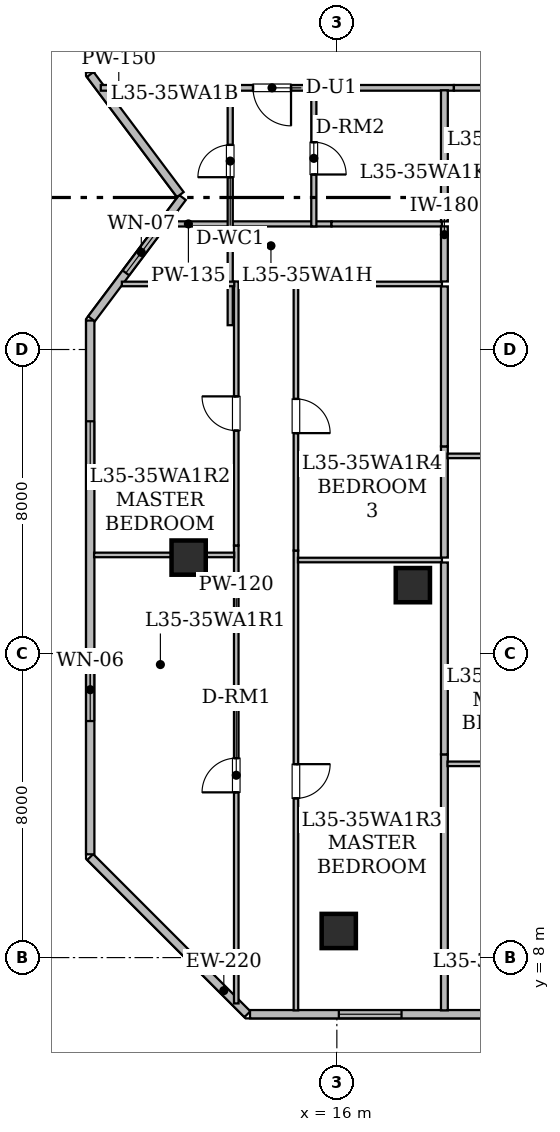
"""IFC4 building model, lengths in metres.
Left out: names, types, materials, properties, quantities, classifications, styles, units other than length and angle.
Written with IfcOpenShell. Run it as: python <this file> out.ifc"""

import sys

from ifc_helpers import new_model, si_unit, direction, frame, frame_2d, origin, origin_2d, place, context, subcontext, project, spatial, rectangle, hollow_rectangle, extrude, element, fill, save


model = new_model("IFC4")
c1 = context("Model", 3, precision=1e-05, world=origin(), true_north=direction((0.0, 1.0)))
c2 = subcontext(c1, "Body", "Model", "MODEL_VIEW")
j1 = project(units=[si_unit("LENGTHUNIT", "METRE"), si_unit("PLANEANGLEUNIT", "RADIAN")], contexts=[c1])
p1 = place(None, origin())
s1 = spatial("IfcSite", under=j1, at=p1, CompositionType="ELEMENT")
p2 = place(p1, origin())
s2 = spatial("IfcBuilding", under=s1, at=p2, CompositionType="ELEMENT")
p3 = place(p2, frame((0.0, 0.0, 138.4)))
s3 = spatial("IfcBuildingStorey", under=s2, at=p3, CompositionType="ELEMENT", Elevation=138.4)
for number, where, z_axis, x_axis in (
    (1, (16.05, 8.7, 0.0), (0.0, 0.0, 1.0), (1.0, 0.0, 0.0)),
    (2, (12.1, 18.525, 0.0), (0.0, 0.0, 1.0), (1.0, 0.0, 0.0)),
    (3, (18.0, 17.8, 0.0), (0.0, 0.0, 1.0), (1.0, 0.0, 0.0)),
):
    element("IfcColumn", number, at=place(p3, frame(where, z_axis=z_axis, x_axis=x_axis)), inside=s3, PredefinedType="COLUMN", context=c2, shape_type="SweptSolid", body=[
        extrude(hollow_rectangle(XDim=0.9, YDim=0.9, WallThickness=0.045, at=origin_2d()), origin(), (0.0, 0.0, 1.0), 3.65),
    ])
p4 = place(p3, frame((13.646, 6.51, 0.0), z_axis=(0.0, 0.0, 1.0), x_axis=(-0.707106781187, 0.707106781187, 0.0)))
e4 = element("IfcWall", 4, at=p4, inside=s3, PredefinedType="STANDARD", context=c2, shape_type="SweptSolid", body=[
    extrude(rectangle(XDim=5.849, YDim=0.22, at=frame_2d((2.925, 0.0))), origin(), (0.0, 0.0, 1.0), 3.43),
])
p5 = place(p3, frame((9.51, 10.717, 0.0), z_axis=(0.0, 0.0, 1.0), x_axis=(0.0, 1.0, 0.0)))
e5 = element("IfcWall", 5, at=p5, inside=s3, PredefinedType="STANDARD", context=c2, shape_type="SweptSolid", body=[
    extrude(rectangle(XDim=14.046, YDim=0.22, at=frame_2d((7.023, 0.0))), origin(), (0.0, 0.0, 1.0), 3.43),
])
p6 = place(p5, frame((3.507, 0.0, 0.85)))
e6 = element("IfcOpeningElement", 6, at=p6, cuts=e5, PredefinedType="OPENING", context=c2, shape_type="SweptSolid", body=[
    extrude(rectangle(XDim=1.65, YDim=1.55, at=frame_2d((0.825, 0.775))), frame((0.0, 0.12, 0.0), z_axis=(0.0, -1.0, 0.0), x_axis=(1.0, 0.0, 0.0)), (0.0, 0.0, 1.0), 0.24),
])
p7 = place(p5, frame((9.745, 0.0, 0.85)))
e7 = element("IfcOpeningElement", 7, at=p7, cuts=e5, PredefinedType="OPENING", context=c2, shape_type="SweptSolid", body=[
    extrude(rectangle(XDim=1.65, YDim=1.55, at=frame_2d((0.825, 0.775))), frame((0.0, 0.12, 0.0), z_axis=(0.0, -1.0, 0.0), x_axis=(1.0, 0.0, 0.0)), (0.0, 0.0, 1.0), 0.24),
])
p8 = place(p3, frame((9.544, 24.808, 0.0), z_axis=(0.0, 0.0, 1.0), x_axis=(0.600019580308, 0.799985314394, 0.0)))
e8 = element("IfcWall", 8, at=p8, inside=s3, PredefinedType="STANDARD", context=c2, shape_type="SweptSolid", body=[
    extrude(rectangle(XDim=3.99, YDim=0.22, at=frame_2d((1.995, 0.0))), origin(), (0.0, 0.0, 1.0), 3.43),
])
p9 = place(p8, frame((1.509, 0.0, 0.85)))
e9 = element("IfcOpeningElement", 9, at=p9, cuts=e8, PredefinedType="OPENING", context=c2, shape_type="SweptSolid", body=[
    extrude(rectangle(XDim=1.35, YDim=1.5, at=frame_2d((0.675, 0.75))), frame((0.0, 0.12, 0.0), z_axis=(0.0, -1.0, 0.0), x_axis=(1.0, 0.0, 0.0)), (0.0, 0.0, 1.0), 0.24),
])
p10 = place(p3, frame((11.881, 28.077, 0.0), z_axis=(0.0, 0.0, 1.0), x_axis=(-0.600158184825, 0.799881336942, 0.0)))
e10 = element("IfcWall", 10, at=p10, inside=s3, PredefinedType="STANDARD", context=c2, shape_type="SweptSolid", body=[
    extrude(rectangle(XDim=3.951, YDim=0.22, at=frame_2d((1.975, 0.0))), origin(), (0.0, 0.0, 1.0), 3.43),
])
p11 = place(p3, frame((9.51, 31.293, 0.0), z_axis=(0.0, 0.0, 1.0), x_axis=(0.0, 1.0, 0.0)))
e11 = element("IfcWall", 11, at=p11, inside=s3, PredefinedType="STANDARD", context=c2, shape_type="SweptSolid", body=[
    extrude(rectangle(XDim=14.061, YDim=0.22, at=frame_2d((7.031, 0.0))), origin(), (0.0, 0.0, 1.0), 3.43),
])
p12 = place(p11, frame((5.459, 0.0, 0.8)))
e12 = element("IfcOpeningElement", 12, at=p12, cuts=e11, PredefinedType="OPENING", context=c2, shape_type="SweptSolid", body=[
    extrude(rectangle(XDim=1.2, YDim=1.5, at=frame_2d((0.6, 0.75))), frame((0.0, 0.12, 0.0), z_axis=(0.0, -1.0, 0.0), x_axis=(1.0, 0.0, 0.0)), (0.0, 0.0, 1.0), 0.24),
])
p13 = place(p11, frame((9.237, 0.0, 0.85)))
e13 = element("IfcOpeningElement", 13, at=p13, cuts=e11, PredefinedType="OPENING", context=c2, shape_type="SweptSolid", body=[
    extrude(rectangle(XDim=1.65, YDim=1.55, at=frame_2d((0.825, 0.775))), frame((0.0, 0.12, 0.0), z_axis=(0.0, -1.0, 0.0), x_axis=(1.0, 0.0, 0.0)), (0.0, 0.0, 1.0), 0.24),
])
p14 = place(p3, frame((52.283, 6.51, 0.0), z_axis=(0.0, 0.0, 1.0), x_axis=(-1.0, 0.0, 0.0)))
e14 = element("IfcWall", 14, at=p14, inside=s3, PredefinedType="STANDARD", context=c2, shape_type="SweptSolid", body=[
    extrude(rectangle(XDim=38.568, YDim=0.22, at=frame_2d((19.284, 0.0))), origin(), (0.0, 0.0, 1.0), 3.43),
])
p15 = place(p14, frame((34.581, 0.0, 0.85)))
e15 = element("IfcOpeningElement", 15, at=p15, cuts=e14, PredefinedType="OPENING", context=c2, shape_type="SweptSolid", body=[
    extrude(rectangle(XDim=1.65, YDim=1.55, at=frame_2d((0.825, 0.775))), frame((0.0, 0.12, 0.0), z_axis=(0.0, -1.0, 0.0), x_axis=(1.0, 0.0, 0.0)), (0.0, 0.0, 1.0), 0.24),
])
p16 = place(p14, frame((25.992, 0.0, 0.85)))
e16 = element("IfcOpeningElement", 16, at=p16, cuts=e14, PredefinedType="OPENING", context=c2, shape_type="SweptSolid", body=[
    extrude(rectangle(XDim=1.65, YDim=1.55, at=frame_2d((0.825, 0.775))), frame((0.0, 0.12, 0.0), z_axis=(0.0, -1.0, 0.0), x_axis=(1.0, 0.0, 0.0)), (0.0, 0.0, 1.0), 0.24),
])
p17 = place(p14, frame((28.375, 0.0, 0.8)))
e17 = element("IfcOpeningElement", 17, at=p17, cuts=e14, PredefinedType="OPENING", context=c2, shape_type="SweptSolid", body=[
    extrude(rectangle(XDim=1.2, YDim=1.5, at=frame_2d((0.6, 0.75))), frame((0.0, 0.12, 0.0), z_axis=(0.0, -1.0, 0.0), x_axis=(1.0, 0.0, 0.0)), (0.0, 0.0, 1.0), 0.24),
])
p18 = place(p14, frame((30.784, 0.0, 0.85)))
e18 = element("IfcOpeningElement", 18, at=p18, cuts=e14, PredefinedType="OPENING", context=c2, shape_type="SweptSolid", body=[
    extrude(rectangle(XDim=1.65, YDim=1.55, at=frame_2d((0.825, 0.775))), frame((0.0, 0.12, 0.0), z_axis=(0.0, -1.0, 0.0), x_axis=(1.0, 0.0, 0.0)), (0.0, 0.0, 1.0), 0.24),
])
p19 = place(p14, frame((21.298, 0.0, 0.85)))
e19 = element("IfcOpeningElement", 19, at=p19, cuts=e14, PredefinedType="OPENING", context=c2, shape_type="SweptSolid", body=[
    extrude(rectangle(XDim=1.65, YDim=1.55, at=frame_2d((0.825, 0.775))), frame((0.0, 0.12, 0.0), z_axis=(0.0, -1.0, 0.0), x_axis=(1.0, 0.0, 0.0)), (0.0, 0.0, 1.0), 0.24),
])
p20 = place(p14, frame((14.033, 0.0, 0.85)))
e20 = element("IfcOpeningElement", 20, at=p20, cuts=e14, PredefinedType="OPENING", context=c2, shape_type="SweptSolid", body=[
    extrude(rectangle(XDim=1.65, YDim=1.55, at=frame_2d((0.825, 0.775))), frame((0.0, 0.12, 0.0), z_axis=(0.0, -1.0, 0.0), x_axis=(1.0, 0.0, 0.0)), (0.0, 0.0, 1.0), 0.24),
])
p21 = place(p14, frame((6.688, 0.0, 0.85)))
e21 = element("IfcOpeningElement", 21, at=p21, cuts=e14, PredefinedType="OPENING", context=c2, shape_type="SweptSolid", body=[
    extrude(rectangle(XDim=1.65, YDim=1.55, at=frame_2d((0.825, 0.775))), frame((0.0, 0.12, 0.0), z_axis=(0.0, -1.0, 0.0), x_axis=(1.0, 0.0, 0.0)), (0.0, 0.0, 1.0), 0.24),
])
p22 = place(p14, frame((0.587, 0.0, 0.85)))
e22 = element("IfcOpeningElement", 22, at=p22, cuts=e14, PredefinedType="OPENING", context=c2, shape_type="SweptSolid", body=[
    extrude(rectangle(XDim=1.65, YDim=1.55, at=frame_2d((0.825, 0.775))), frame((0.0, 0.12, 0.0), z_axis=(0.0, -1.0, 0.0), x_axis=(1.0, 0.0, 0.0)), (0.0, 0.0, 1.0), 0.24),
])
p23 = place(p3, frame((15.643, 30.885, 0.0), z_axis=(0.0, 0.0, 1.0), x_axis=(-1.0, 0.0, 0.0)))
e23 = element("IfcWall", 23, at=p23, inside=s3, PredefinedType="STANDARD", context=c2, shape_type="SweptSolid", body=[
    extrude(rectangle(XDim=2.698, YDim=0.15, at=frame_2d((1.349, 0.0))), origin(), (0.0, 0.0, 1.0), 3.43),
])
p24 = place(p23, frame((0.849, 0.0, 0.0)))
e24 = element("IfcOpeningElement", 24, at=p24, cuts=e23, PredefinedType="OPENING", context=c2, shape_type="SweptSolid", body=[
    extrude(rectangle(XDim=1.0, YDim=2.15, at=frame_2d((0.5, 1.075))), frame((0.0, 0.085, 0.0), z_axis=(0.0, -1.0, 0.0), x_axis=(1.0, 0.0, 0.0)), (0.0, 0.0, 1.0), 0.17),
])
p25 = place(p3, frame((12.945, 30.885, 0.0), z_axis=(0.0, 0.0, 1.0), x_axis=(-1.0, 0.0, 0.0)))
e25 = element("IfcWall", 25, at=p25, inside=s3, PredefinedType="STANDARD", context=c2, shape_type="SweptSolid", body=[
    extrude(rectangle(XDim=3.157, YDim=0.15, at=frame_2d((1.579, 0.0))), origin(), (0.0, 0.0, 1.0), 2.876),
])
p26 = place(p3, frame((19.08, 30.885, 0.0), z_axis=(0.0, 0.0, 1.0), x_axis=(-1.0, 0.0, 0.0)))
e26 = element("IfcWall", 26, at=p26, inside=s3, PredefinedType="STANDARD", context=c2, shape_type="SweptSolid", body=[
    extrude(rectangle(XDim=3.437, YDim=0.15, at=frame_2d((1.719, 0.0))), origin(), (0.0, 0.0, 1.0), 2.647),
])
p27 = place(p3, frame((22.268, 30.885, 0.0), z_axis=(0.0, 0.0, 1.0), x_axis=(-1.0, 0.0, 0.0)))
e27 = element("IfcWall", 27, at=p27, inside=s3, PredefinedType="STANDARD", context=c2, shape_type="SweptSolid", body=[
    extrude(rectangle(XDim=3.188, YDim=0.15, at=frame_2d((1.594, 0.0))), origin(), (0.0, 0.0, 1.0), 3.43),
])
p28 = place(p3, frame((11.429, 27.305, 0.0), z_axis=(0.0, 0.0, 1.0), x_axis=(1.0, 0.0, 0.0)))
e28 = element("IfcWall", 28, at=p28, inside=s3, PredefinedType="PARTITIONING", context=c2, shape_type="SweptSolid", body=[
    extrude(rectangle(XDim=4.43, YDim=0.135, at=frame_2d((2.215, 0.0))), origin(), (0.0, 0.0, 1.0), 2.876),
])
p29 = place(p3, frame((13.194, 24.64, 0.0), z_axis=(0.0, 0.0, 1.0), x_axis=(0.0, 1.0, 0.0)))
e29 = element("IfcWall", 29, at=p29, inside=s3, PredefinedType="PARTITIONING", context=c2, shape_type="SweptSolid", body=[
    extrude(rectangle(XDim=6.18, YDim=0.135, at=frame_2d((3.09, 0.0))), origin(), (0.0, 0.0, 1.0), 3.43),
])
p30 = place(p29, frame((3.894, 0.0, 0.0)))
e30 = element("IfcOpeningElement", 30, at=p30, cuts=e29, PredefinedType="OPENING", context=c2, shape_type="SweptSolid", body=[
    extrude(rectangle(XDim=0.85, YDim=2.1, at=frame_2d((0.425, 1.05))), frame((0.0, 0.077, 0.0), z_axis=(0.0, -1.0, 0.0), x_axis=(1.0, 0.0, 0.0)), (0.0, 0.0, 1.0), 0.155),
])
p31 = place(p3, frame((15.394, 30.82, 0.0), z_axis=(0.0, 0.0, 1.0), x_axis=(0.0, -1.0, 0.0)))
e31 = element("IfcWall", 31, at=p31, inside=s3, PredefinedType="PARTITIONING", context=c2, shape_type="SweptSolid", body=[
    extrude(rectangle(XDim=3.58, YDim=0.135, at=frame_2d((1.79, 0.0))), origin(), (0.0, 0.0, 1.0), 3.43),
])
p32 = place(p31, frame((1.365, 0.0, 0.0)))
e32 = element("IfcOpeningElement", 32, at=p32, cuts=e31, PredefinedType="OPENING", context=c2, shape_type="SweptSolid", body=[
    extrude(rectangle(XDim=0.85, YDim=2.1, at=frame_2d((0.425, 1.05))), frame((0.0, 0.077, 0.0), z_axis=(0.0, -1.0, 0.0), x_axis=(1.0, 0.0, 0.0)), (0.0, 0.0, 1.0), 0.155),
])
p33 = place(p3, frame((15.859, 27.305, 0.0), z_axis=(0.0, 0.0, 1.0), x_axis=(1.0, 0.0, 0.0)))
e33 = element("IfcWall", 33, at=p33, inside=s3, PredefinedType="PARTITIONING", context=c2, shape_type="SweptSolid", body=[
    extrude(rectangle(XDim=2.906, YDim=0.135, at=frame_2d((1.453, 0.0))), origin(), (0.0, 0.0, 1.0), 2.647),
])
p34 = place(p3, frame((13.353, 6.794, 0.0), z_axis=(0.0, 0.0, 1.0), x_axis=(0.0, 1.0, 0.0)))
e34 = element("IfcWall", 34, at=p34, inside=s3, PredefinedType="PARTITIONING", context=c2, shape_type="SweptSolid", body=[
    extrude(rectangle(XDim=12.05, YDim=0.12, at=frame_2d((6.025, 0.0))), origin(), (0.0, 0.0, 1.0), 2.647),
])
p35 = place(p34, frame((5.554, 0.0, 0.0)))
e35 = element("IfcOpeningElement", 35, at=p35, cuts=e34, PredefinedType="OPENING", context=c2, shape_type="SweptSolid", body=[
    extrude(rectangle(XDim=0.9, YDim=2.1, at=frame_2d((0.45, 1.05))), frame((0.0, 0.07, 0.0), z_axis=(0.0, -1.0, 0.0), x_axis=(1.0, 0.0, 0.0)), (0.0, 0.0, 1.0), 0.14),
])
p36 = place(p3, frame((13.353, 18.844, 0.0), z_axis=(0.0, 0.0, 1.0), x_axis=(0.0, 1.0, 0.0)))
e36 = element("IfcWall", 36, at=p36, inside=s3, PredefinedType="PARTITIONING", context=c2, shape_type="SweptSolid", body=[
    extrude(rectangle(XDim=6.946, YDim=0.12, at=frame_2d((3.473, 0.0))), origin(), (0.0, 0.0, 1.0), 3.43),
])
p37 = place(p36, frame((3.023, 0.0, 0.0)))
e37 = element("IfcOpeningElement", 37, at=p37, cuts=e36, PredefinedType="OPENING", context=c2, shape_type="SweptSolid", body=[
    extrude(rectangle(XDim=0.9, YDim=2.1, at=frame_2d((0.45, 1.05))), frame((0.0, 0.07, 0.0), z_axis=(0.0, -1.0, 0.0), x_axis=(1.0, 0.0, 0.0)), (0.0, 0.0, 1.0), 0.14),
])
p38 = place(p3, frame((13.299, 25.725, 0.0), z_axis=(0.0, 0.0, 1.0), x_axis=(-1.0, 0.0, 0.0)))
e38 = element("IfcWall", 38, at=p38, inside=s3, PredefinedType="PARTITIONING", context=c2, shape_type="SweptSolid", body=[
    extrude(rectangle(XDim=2.956, YDim=0.12, at=frame_2d((1.478, 0.0))), origin(), (0.0, 0.0, 1.0), 2.876),
])
p39 = place(p3, frame((14.923, 18.71, 0.0), z_axis=(0.0, 0.0, 1.0), x_axis=(0.0, -1.0, 0.0)))
e39 = element("IfcWall", 39, at=p39, inside=s3, PredefinedType="PARTITIONING", context=c2, shape_type="SweptSolid", body=[
    extrude(rectangle(XDim=12.098, YDim=0.12, at=frame_2d((6.049, 0.0))), origin(), (0.0, 0.0, 1.0), 2.647),
])
p40 = place(p39, frame((5.62, 0.0, 0.0)))
e40 = element("IfcOpeningElement", 40, at=p40, cuts=e39, PredefinedType="OPENING", context=c2, shape_type="SweptSolid", body=[
    extrude(rectangle(XDim=0.9, YDim=2.1, at=frame_2d((0.45, 1.05))), frame((0.0, 0.07, 0.0), z_axis=(0.0, -1.0, 0.0), x_axis=(1.0, 0.0, 0.0)), (0.0, 0.0, 1.0), 0.14),
])
p41 = place(p3, frame((18.765, 25.725, 0.0), z_axis=(0.0, 0.0, 1.0), x_axis=(-1.0, 0.0, 0.0)))
e41 = element("IfcWall", 41, at=p41, inside=s3, PredefinedType="PARTITIONING", context=c2, shape_type="SweptSolid", body=[
    extrude(rectangle(XDim=3.907, YDim=0.12, at=frame_2d((1.954, 0.0))), origin(), (0.0, 0.0, 1.0), 2.647),
])
p42 = place(p3, frame((14.923, 25.79, 0.0), z_axis=(0.0, 0.0, 1.0), x_axis=(0.0, -1.0, 0.0)))
e42 = element("IfcWall", 42, at=p42, inside=s3, PredefinedType="PARTITIONING", context=c2, shape_type="SweptSolid", body=[
    extrude(rectangle(XDim=7.08, YDim=0.12, at=frame_2d((3.54, 0.0))), origin(), (0.0, 0.0, 1.0), 3.43),
])
p43 = place(p42, frame((3.09, 0.0, 0.0)))
e43 = element("IfcOpeningElement", 43, at=p43, cuts=e42, PredefinedType="OPENING", context=c2, shape_type="SweptSolid", body=[
    extrude(rectangle(XDim=0.9, YDim=2.1, at=frame_2d((0.45, 1.05))), frame((0.0, 0.07, 0.0), z_axis=(0.0, -1.0, 0.0), x_axis=(1.0, 0.0, 0.0)), (0.0, 0.0, 1.0), 0.14),
])
p44 = place(p3, frame((18.83, 27.24, 0.0), z_axis=(0.0, 0.0, 1.0), x_axis=(0.0, -1.0, 0.0)))
e44 = element("IfcWall", 44, at=p44, inside=s3, PredefinedType="STANDARD", context=c2, shape_type="SweptSolid", body=[
    extrude(rectangle(XDim=1.45, YDim=0.18, at=frame_2d((0.725, 0.0))), origin(), (0.0, 0.0, 1.0), 3.43),
])
p45 = place(p3, frame((18.83, 30.82, 0.0), z_axis=(0.0, 0.0, 1.0), x_axis=(0.0, -1.0, 0.0)))
e45 = element("IfcWall", 45, at=p45, inside=s3, PredefinedType="STANDARD", context=c2, shape_type="SweptSolid", body=[
    extrude(rectangle(XDim=3.45, YDim=0.18, at=frame_2d((1.725, 0.0))), origin(), (0.0, 0.0, 1.0), 3.013),
])
p46 = place(p3, frame((9.612, 18.595, 0.0), z_axis=(0.0, 0.0, 1.0), x_axis=(1.0, 0.0, 0.0)))
e46 = element("IfcWall", 46, at=p46, inside=s3, PredefinedType="PARTITIONING", context=c2, shape_type="SweptSolid", body=[
    extrude(rectangle(XDim=3.687, YDim=0.12, at=frame_2d((1.844, 0.0))), origin(), (0.0, 0.0, 1.0), 2.647),
])
p47 = place(p3, frame((14.977, 18.461, 0.0), z_axis=(0.0, 0.0, 1.0), x_axis=(1.0, 0.0, 0.0)))
e47 = element("IfcWall", 47, at=p47, inside=s3, PredefinedType="PARTITIONING", context=c2, shape_type="SweptSolid", body=[
    extrude(rectangle(XDim=3.788, YDim=0.12, at=frame_2d((1.894, 0.0))), origin(), (0.0, 0.0, 1.0), 2.647),
])
p48 = place(p3, frame((18.83, 13.347, 0.0), z_axis=(0.0, 0.0, 1.0), x_axis=(0.0, -1.0, 0.0)))
e48 = element("IfcWall", 48, at=p48, inside=s3, PredefinedType="STANDARD", context=c2, shape_type="SweptSolid", body=[
    extrude(rectangle(XDim=6.735, YDim=0.18, at=frame_2d((3.367, 0.0))), origin(), (0.0, 0.0, 1.0), 2.876),
])
p49 = place(p3, frame((18.83, 18.396, 0.0), z_axis=(0.0, 0.0, 1.0), x_axis=(0.0, -1.0, 0.0)))
e49 = element("IfcWall", 49, at=p49, inside=s3, PredefinedType="STANDARD", context=c2, shape_type="SweptSolid", body=[
    extrude(rectangle(XDim=5.049, YDim=0.18, at=frame_2d((2.524, 0.0))), origin(), (0.0, 0.0, 1.0), 2.647),
])
p50 = place(p3, frame((18.83, 21.451, 0.0), z_axis=(0.0, 0.0, 1.0), x_axis=(0.0, -1.0, 0.0)))
e50 = element("IfcWall", 50, at=p50, inside=s3, PredefinedType="STANDARD", context=c2, shape_type="SweptSolid", body=[
    extrude(rectangle(XDim=2.925, YDim=0.18, at=frame_2d((1.462, 0.0))), origin(), (0.0, 0.0, 1.0), 3.43),
])
p51 = place(p3, frame((18.83, 25.66, 0.0), z_axis=(0.0, 0.0, 1.0), x_axis=(0.0, -1.0, 0.0)))
e51 = element("IfcWall", 51, at=p51, inside=s3, PredefinedType="STANDARD", context=c2, shape_type="SweptSolid", body=[
    extrude(rectangle(XDim=4.209, YDim=0.18, at=frame_2d((2.104, 0.0))), origin(), (0.0, 0.0, 1.0), 3.43),
])
for number, where, z_axis, x_axis in (
    (52, (18.912, 13.098, 0.0), (0.0, 0.0, 1.0), (1.0, 0.0, 0.0)),
    (53, (18.912, 21.201, 0.0), (0.0, 0.0, 1.0), (1.0, 0.0, 0.0)),
):
    element("IfcWall", number, at=place(p3, frame(where, z_axis=z_axis, x_axis=x_axis)), inside=s3, PredefinedType="PARTITIONING", context=c2, shape_type="SweptSolid", body=[
        extrude(rectangle(XDim=3.552, YDim=0.12, at=frame_2d((1.776, 0.0))), origin(), (0.0, 0.0, 1.0), 3.43),
    ])
p52 = place(p9, origin())
e54 = element("IfcWindow", 54, at=p52, inside=s3, PartitioningType="SINGLE_PANEL", PredefinedType="WINDOW", context=c2, shape_type="SweptSolid", body=[
    extrude(rectangle(XDim=1.35, YDim=1.5, at=frame_2d((0.675, 0.75))), frame((0.0, 0.03, 0.0), z_axis=(0.0, -1.0, 0.0), x_axis=(1.0, 0.0, 0.0)), (0.0, 0.0, 1.0), 0.06),
])
fill(e9, e54)
p53 = place(p6, origin())
e55 = element("IfcWindow", 55, at=p53, inside=s3, PartitioningType="SINGLE_PANEL", PredefinedType="WINDOW", context=c2, shape_type="SweptSolid", body=[
    extrude(rectangle(XDim=1.65, YDim=1.55, at=frame_2d((0.825, 0.775))), frame((0.0, 0.03, 0.0), z_axis=(0.0, -1.0, 0.0), x_axis=(1.0, 0.0, 0.0)), (0.0, 0.0, 1.0), 0.06),
])
fill(e6, e55)
p54 = place(p7, origin())
e56 = element("IfcWindow", 56, at=p54, inside=s3, PartitioningType="SINGLE_PANEL", PredefinedType="WINDOW", context=c2, shape_type="SweptSolid", body=[
    extrude(rectangle(XDim=1.65, YDim=1.55, at=frame_2d((0.825, 0.775))), frame((0.0, 0.03, 0.0), z_axis=(0.0, -1.0, 0.0), x_axis=(1.0, 0.0, 0.0)), (0.0, 0.0, 1.0), 0.06),
])
fill(e7, e56)
p55 = place(p15, origin())
e57 = element("IfcWindow", 57, at=p55, inside=s3, PartitioningType="SINGLE_PANEL", PredefinedType="WINDOW", context=c2, shape_type="SweptSolid", body=[
    extrude(rectangle(XDim=1.65, YDim=1.55, at=frame_2d((0.825, 0.775))), frame((0.0, 0.03, 0.0), z_axis=(0.0, -1.0, 0.0), x_axis=(1.0, 0.0, 0.0)), (0.0, 0.0, 1.0), 0.06),
])
fill(e15, e57)
p56 = place(p24, origin())
e58 = element("IfcDoor", 58, at=p56, inside=s3, OperationType="SINGLE_SWING_LEFT", PredefinedType="DOOR", context=c2, shape_type="SweptSolid", body=[
    extrude(rectangle(XDim=1.0, YDim=2.15, at=frame_2d((0.5, 1.075))), frame((0.0, 0.025, 0.0), z_axis=(0.0, -1.0, 0.0), x_axis=(1.0, 0.0, 0.0)), (0.0, 0.0, 1.0), 0.05),
])
fill(e24, e58)
p57 = place(p30, origin())
e59 = element("IfcDoor", 59, at=p57, inside=s3, OperationType="SINGLE_SWING_LEFT", PredefinedType="DOOR", context=c2, shape_type="SweptSolid", body=[
    extrude(rectangle(XDim=0.85, YDim=2.1, at=frame_2d((0.425, 1.05))), frame((0.0, 0.025, 0.0), z_axis=(0.0, -1.0, 0.0), x_axis=(1.0, 0.0, 0.0)), (0.0, 0.0, 1.0), 0.05),
])
fill(e30, e59)
p58 = place(p32, origin())
e60 = element("IfcDoor", 60, at=p58, inside=s3, OperationType="SINGLE_SWING_RIGHT", PredefinedType="DOOR", context=c2, shape_type="SweptSolid", body=[
    extrude(rectangle(XDim=0.85, YDim=2.1, at=frame_2d((0.425, 1.05))), frame((0.0, 0.025, 0.0), z_axis=(0.0, -1.0, 0.0), x_axis=(1.0, 0.0, 0.0)), (0.0, 0.0, 1.0), 0.05),
])
fill(e32, e60)
p59 = place(p35, origin())
e61 = element("IfcDoor", 61, at=p59, inside=s3, OperationType="SINGLE_SWING_LEFT", PredefinedType="DOOR", context=c2, shape_type="SweptSolid", body=[
    extrude(rectangle(XDim=0.9, YDim=2.1, at=frame_2d((0.45, 1.05))), frame((0.0, 0.025, 0.0), z_axis=(0.0, -1.0, 0.0), x_axis=(1.0, 0.0, 0.0)), (0.0, 0.0, 1.0), 0.05),
])
fill(e35, e61)
p60 = place(p37, origin())
e62 = element("IfcDoor", 62, at=p60, inside=s3, OperationType="SINGLE_SWING_RIGHT", PredefinedType="DOOR", context=c2, shape_type="SweptSolid", body=[
    extrude(rectangle(XDim=0.9, YDim=2.1, at=frame_2d((0.45, 1.05))), frame((0.0, 0.025, 0.0), z_axis=(0.0, -1.0, 0.0), x_axis=(1.0, 0.0, 0.0)), (0.0, 0.0, 1.0), 0.05),
])
fill(e37, e62)
p61 = place(p40, origin())
e63 = element("IfcDoor", 63, at=p61, inside=s3, OperationType="SINGLE_SWING_LEFT", PredefinedType="DOOR", context=c2, shape_type="SweptSolid", body=[
    extrude(rectangle(XDim=0.9, YDim=2.1, at=frame_2d((0.45, 1.05))), frame((0.0, 0.025, 0.0), z_axis=(0.0, -1.0, 0.0), x_axis=(1.0, 0.0, 0.0)), (0.0, 0.0, 1.0), 0.05),
])
fill(e40, e63)
p62 = place(p43, origin())
e64 = element("IfcDoor", 64, at=p62, inside=s3, OperationType="SINGLE_SWING_RIGHT", PredefinedType="DOOR", context=c2, shape_type="SweptSolid", body=[
    extrude(rectangle(XDim=0.9, YDim=2.1, at=frame_2d((0.45, 1.05))), frame((0.0, 0.025, 0.0), z_axis=(0.0, -1.0, 0.0), x_axis=(1.0, 0.0, 0.0)), (0.0, 0.0, 1.0), 0.05),
])
fill(e43, e64)
save(model, sys.argv[1])
